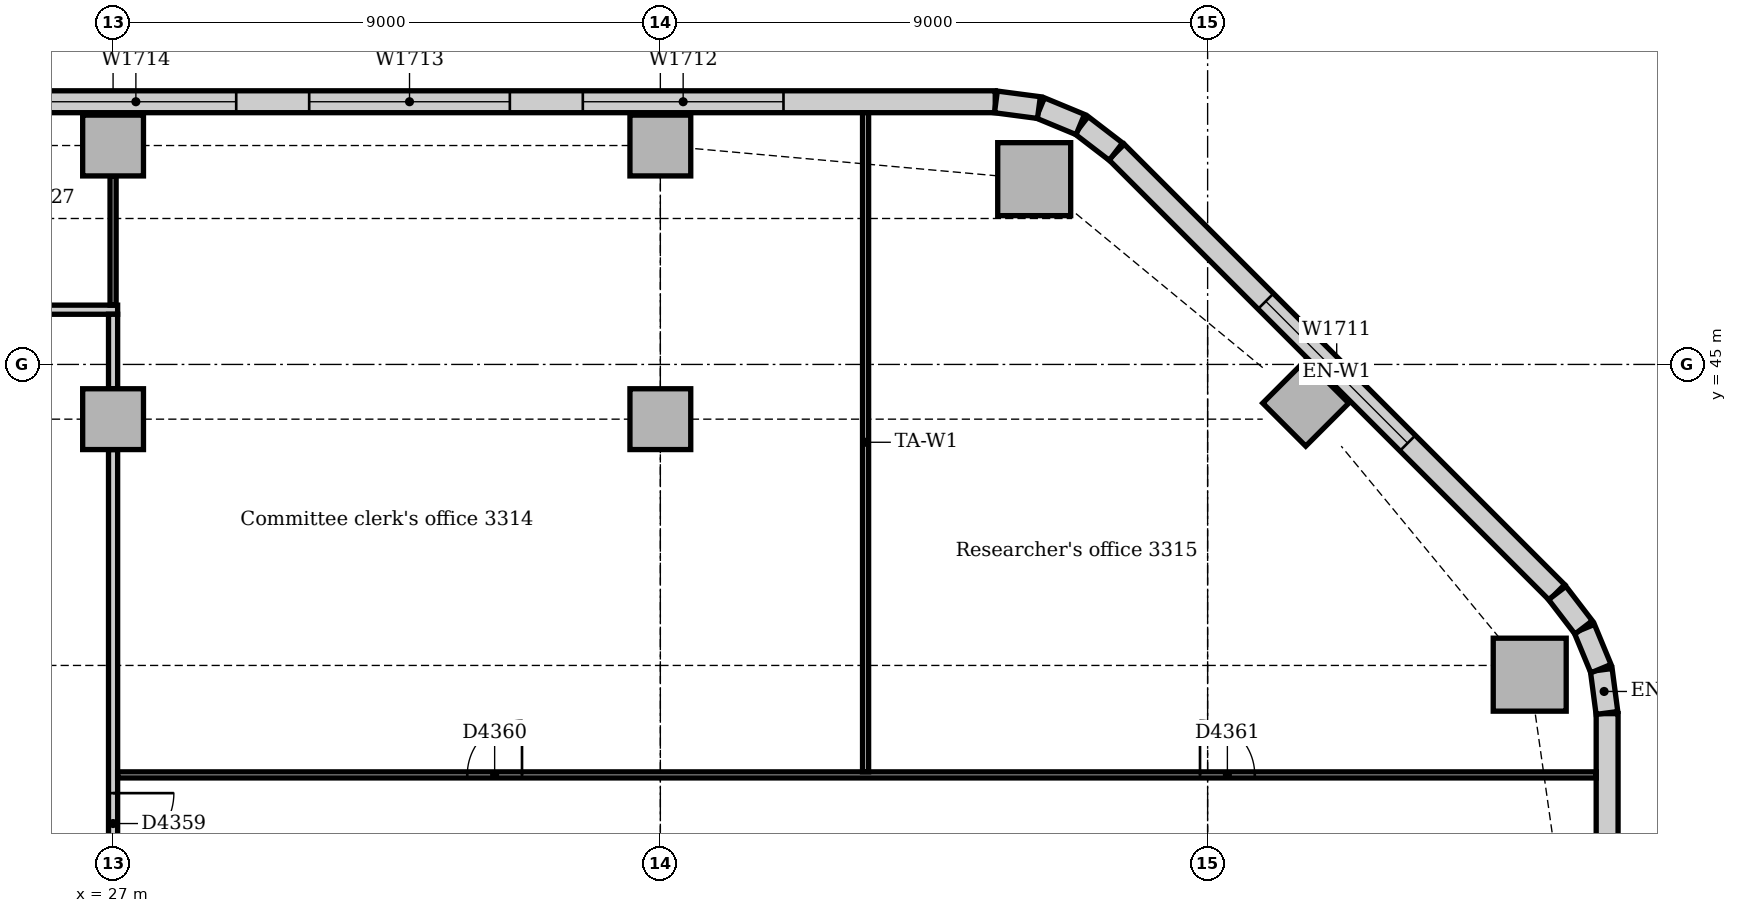
"""IFC4 building model, lengths in metres.
Left out: names, types, materials, properties, quantities, classifications, styles, units other than length and angle.
Written with IfcOpenShell. Run it as: python <this file> out.ifc"""

import sys

from ifc_helpers import new_model, si_unit, direction, frame, frame_2d, origin, origin_2d, place, context, subcontext, project, spatial, rectangle, extrude, element, fill, save


model = new_model("IFC4")
c1 = context("Model", 3, precision=1e-05, world=origin(), true_north=direction((0.0, 1.0)))
c2 = subcontext(c1, "Body", "Model", "MODEL_VIEW")
j1 = project(units=[si_unit("LENGTHUNIT", "METRE"), si_unit("PLANEANGLEUNIT", "RADIAN")], contexts=[c1])
p1 = place(None, origin())
s1 = spatial("IfcSite", under=j1, at=p1, CompositionType="ELEMENT")
p2 = place(p1, origin())
s2 = spatial("IfcBuilding", under=s1, at=p2, CompositionType="ELEMENT")
p3 = place(p2, frame((0.0, 0.0, 140.0)))
s3 = spatial("IfcBuildingStorey", under=s2, at=p3, CompositionType="ELEMENT", Elevation=140.0)
for number, where, z_axis, x_axis in (
    (1, (50.297, 39.898, 0.0), (0.0, 0.0, 1.0), (1.0, 0.0, 0.0)),
    (2, (42.148, 48.047, 0.0), (0.0, 0.0, 1.0), (1.0, 0.0, 0.0)),
):
    element("IfcColumn", number, at=place(p3, frame(where, z_axis=z_axis, x_axis=x_axis)), inside=s3, PredefinedType="COLUMN", context=c2, shape_type="SweptSolid", body=[
        extrude(rectangle(XDim=1.2, YDim=1.2, at=origin_2d()), origin(), (0.0, 0.0, 1.0), 3.7),
    ])
for number, where, z_axis, x_axis in (
    (3, (46.614, 44.364, 0.0), (0.0, 0.0, 1.0), (0.707, 0.707, 0.0)),
    (4, (27.0, 48.6, 0.0), (0.0, 0.0, 1.0), (1.0, 0.0, 0.0)),
    (5, (36.0, 48.6, 0.0), (0.0, 0.0, 1.0), (1.0, 0.0, 0.0)),
    (6, (27.0, 44.1, 0.0), (0.0, 0.0, 1.0), (1.0, 0.0, 0.0)),
    (7, (36.0, 44.1, 0.0), (0.0, 0.0, 1.0), (1.0, 0.0, 0.0)),
):
    element("IfcColumn", number, at=place(p3, frame(where, z_axis=z_axis, x_axis=x_axis)), inside=s3, PredefinedType="COLUMN", context=c2, shape_type="SweptSolid", body=[
        extrude(rectangle(XDim=1.0, YDim=1.0, at=origin_2d()), origin(), (0.0, 0.0, 1.0), 3.7),
    ])
p4 = place(p3, frame((51.57, 14.743, 0.0), z_axis=(0.0, 0.0, 1.0), x_axis=(0.0, 1.0, 0.0)))
e8 = element("IfcWall", 8, at=p4, inside=s3, PredefinedType="STANDARD", context=c2, shape_type="SweptSolid", body=[
    extrude(rectangle(XDim=24.515, YDim=0.36, at=frame_2d((12.257, 0.0))), origin(), (0.0, 0.0, 1.0), 3.7),
])
p5 = place(p4, frame((4.257, 0.0, 0.9)))
e9 = element("IfcOpeningElement", 9, at=p5, cuts=e8, PredefinedType="OPENING", context=c2, shape_type="SweptSolid", body=[
    extrude(rectangle(XDim=1.8, YDim=1.6, at=frame_2d((0.9, 0.8))), frame((0.0, 0.19, 0.0), z_axis=(0.0, -1.0, 0.0), x_axis=(1.0, 0.0, 0.0)), (0.0, 0.0, 1.0), 0.38),
])
p6 = place(p4, frame((8.357, 0.0, 0.9)))
e10 = element("IfcOpeningElement", 10, at=p6, cuts=e8, PredefinedType="OPENING", context=c2, shape_type="SweptSolid", body=[
    extrude(rectangle(XDim=3.3, YDim=1.6, at=frame_2d((1.65, 0.8))), frame((0.0, 0.19, 0.0), z_axis=(0.0, -1.0, 0.0), x_axis=(1.0, 0.0, 0.0)), (0.0, 0.0, 1.0), 0.38),
])
p7 = place(p4, frame((12.857, 0.0, 0.9)))
e11 = element("IfcOpeningElement", 11, at=p7, cuts=e8, PredefinedType="OPENING", context=c2, shape_type="SweptSolid", body=[
    extrude(rectangle(XDim=3.3, YDim=1.6, at=frame_2d((1.65, 0.8))), frame((0.0, 0.19, 0.0), z_axis=(0.0, -1.0, 0.0), x_axis=(1.0, 0.0, 0.0)), (0.0, 0.0, 1.0), 0.38),
])
p8 = place(p4, frame((17.357, 0.0, 0.9)))
e12 = element("IfcOpeningElement", 12, at=p8, cuts=e8, PredefinedType="OPENING", context=c2, shape_type="SweptSolid", body=[
    extrude(rectangle(XDim=3.3, YDim=1.6, at=frame_2d((1.65, 0.8))), frame((0.0, 0.19, 0.0), z_axis=(0.0, -1.0, 0.0), x_axis=(1.0, 0.0, 0.0)), (0.0, 0.0, 1.0), 0.38),
])
p9 = place(p3, frame((50.744, 41.251, 0.0), z_axis=(0.0, 0.0, 1.0), x_axis=(-0.707106781187, 0.707106781187, 0.0)))
e13 = element("IfcWall", 13, at=p9, inside=s3, PredefinedType="STANDARD", context=c2, shape_type="SweptSolid", body=[
    extrude(rectangle(XDim=10.243, YDim=0.36, at=frame_2d((5.121, 0.0))), origin(), (0.0, 0.0, 1.0), 3.7),
])
p10 = place(p9, frame((3.471, 0.0, 0.9)))
e14 = element("IfcOpeningElement", 14, at=p10, cuts=e13, PredefinedType="OPENING", context=c2, shape_type="SweptSolid", body=[
    extrude(rectangle(XDim=3.3, YDim=1.6, at=frame_2d((1.65, 0.8))), frame((0.0, 0.19, 0.0), z_axis=(0.0, -1.0, 0.0), x_axis=(1.0, 0.0, 0.0)), (0.0, 0.0, 1.0), 0.38),
])
p11 = place(p3, frame((41.507, 49.32, 0.0), z_axis=(0.0, 0.0, 1.0), x_axis=(-1.0, 0.0, 0.0)))
e15 = element("IfcWall", 15, at=p11, inside=s3, PredefinedType="STANDARD", context=c2, shape_type="SweptSolid", body=[
    extrude(rectangle(XDim=37.265, YDim=0.36, at=frame_2d((18.632, 0.0))), origin(), (0.0, 0.0, 1.0), 3.7),
])
p12 = place(p11, frame((3.482, 0.0, 0.9)))
e16 = element("IfcOpeningElement", 16, at=p12, cuts=e15, PredefinedType="OPENING", context=c2, shape_type="SweptSolid", body=[
    extrude(rectangle(XDim=3.3, YDim=1.6, at=frame_2d((1.65, 0.8))), frame((0.0, 0.19, 0.0), z_axis=(0.0, -1.0, 0.0), x_axis=(1.0, 0.0, 0.0)), (0.0, 0.0, 1.0), 0.38),
])
p13 = place(p11, frame((7.982, 0.0, 0.9)))
e17 = element("IfcOpeningElement", 17, at=p13, cuts=e15, PredefinedType="OPENING", context=c2, shape_type="SweptSolid", body=[
    extrude(rectangle(XDim=3.3, YDim=1.6, at=frame_2d((1.65, 0.8))), frame((0.0, 0.19, 0.0), z_axis=(0.0, -1.0, 0.0), x_axis=(1.0, 0.0, 0.0)), (0.0, 0.0, 1.0), 0.38),
])
p14 = place(p11, frame((12.482, 0.0, 0.9)))
e18 = element("IfcOpeningElement", 18, at=p14, cuts=e15, PredefinedType="OPENING", context=c2, shape_type="SweptSolid", body=[
    extrude(rectangle(XDim=3.3, YDim=1.6, at=frame_2d((1.65, 0.8))), frame((0.0, 0.19, 0.0), z_axis=(0.0, -1.0, 0.0), x_axis=(1.0, 0.0, 0.0)), (0.0, 0.0, 1.0), 0.38),
])
p15 = place(p11, frame((17.032, 0.0, 0.9)))
e19 = element("IfcOpeningElement", 19, at=p15, cuts=e15, PredefinedType="OPENING", context=c2, shape_type="SweptSolid", body=[
    extrude(rectangle(XDim=1.8, YDim=1.6, at=frame_2d((0.9, 0.8))), frame((0.0, 0.19, 0.0), z_axis=(0.0, -1.0, 0.0), x_axis=(1.0, 0.0, 0.0)), (0.0, 0.0, 1.0), 0.38),
])
p16 = place(p11, frame((21.482, 0.0, 0.9)))
e20 = element("IfcOpeningElement", 20, at=p16, cuts=e15, PredefinedType="OPENING", context=c2, shape_type="SweptSolid", body=[
    extrude(rectangle(XDim=3.3, YDim=1.6, at=frame_2d((1.65, 0.8))), frame((0.0, 0.19, 0.0), z_axis=(0.0, -1.0, 0.0), x_axis=(1.0, 0.0, 0.0)), (0.0, 0.0, 1.0), 0.38),
])
p17 = place(p11, frame((26.032, 0.0, 0.9)))
e21 = element("IfcOpeningElement", 21, at=p17, cuts=e15, PredefinedType="OPENING", context=c2, shape_type="SweptSolid", body=[
    extrude(rectangle(XDim=1.8, YDim=1.6, at=frame_2d((0.9, 0.8))), frame((0.0, 0.19, 0.0), z_axis=(0.0, -1.0, 0.0), x_axis=(1.0, 0.0, 0.0)), (0.0, 0.0, 1.0), 0.38),
])
p18 = place(p11, frame((30.482, 0.0, 0.9)))
e22 = element("IfcOpeningElement", 22, at=p18, cuts=e15, PredefinedType="OPENING", context=c2, shape_type="SweptSolid", body=[
    extrude(rectangle(XDim=3.3, YDim=1.6, at=frame_2d((1.65, 0.8))), frame((0.0, 0.19, 0.0), z_axis=(0.0, -1.0, 0.0), x_axis=(1.0, 0.0, 0.0)), (0.0, 0.0, 1.0), 0.38),
])
for number, where, z_axis, x_axis in (
    (23, (51.567, 39.269, 0.0), (0.0, 0.0, 1.0), (-0.131, 0.991, 0.0)),
    (24, (51.468, 39.997, 0.0), (0.0, 0.0, 1.0), (-0.383, 0.924, 0.0)),
):
    element("IfcWall", number, at=place(p3, frame(where, z_axis=z_axis, x_axis=x_axis)), inside=s3, PredefinedType="STANDARD", context=c2, shape_type="SweptSolid", body=[
        extrude(rectangle(XDim=0.713, YDim=0.36, at=frame_2d((0.356, 0.0))), origin(), (0.0, 0.0, 1.0), 3.7),
    ])
for number, where, z_axis, x_axis in (
    (25, (51.184, 40.675, 0.0), (0.0, 0.0, 1.0), (-0.609, 0.793, 0.0)),
    (26, (43.491, 48.5, 0.0), (0.0, 0.0, 1.0), (-0.793, 0.609, 0.0)),
):
    element("IfcWall", number, at=place(p3, frame(where, z_axis=z_axis, x_axis=x_axis)), inside=s3, PredefinedType="STANDARD", context=c2, shape_type="SweptSolid", body=[
        extrude(rectangle(XDim=0.713, YDim=0.36, at=frame_2d((0.357, 0.0))), origin(), (0.0, 0.0, 1.0), 3.7),
    ])
for number, where, z_axis, x_axis in (
    (27, (42.906, 48.945, 0.0), (0.0, 0.0, 1.0), (-0.924, 0.383, 0.0)),
    (28, (42.226, 49.224, 0.0), (0.0, 0.0, 1.0), (-0.991, 0.131, 0.0)),
):
    element("IfcWall", number, at=place(p3, frame(where, z_axis=z_axis, x_axis=x_axis)), inside=s3, PredefinedType="STANDARD", context=c2, shape_type="SweptSolid", body=[
        extrude(rectangle(XDim=0.713, YDim=0.36, at=frame_2d((0.356, 0.0))), origin(), (0.0, 0.0, 1.0), 3.7),
    ])
p19 = place(p3, frame((2.053, 45.9, 0.0), z_axis=(0.0, 0.0, 1.0), x_axis=(1.0, 0.0, 0.0)))
e29 = element("IfcWall", 29, at=p19, inside=s3, PredefinedType="PARTITIONING", context=c2, shape_type="SweptSolid", body=[
    extrude(rectangle(XDim=25.022, YDim=0.15, at=frame_2d((12.511, 0.0))), origin(), (0.0, 0.0, 1.0), 3.7),
])
p20 = place(p19, frame((5.35, 0.0, 0.0)))
e30 = element("IfcOpeningElement", 30, at=p20, cuts=e29, PredefinedType="OPENING", context=c2, shape_type="SweptSolid", body=[
    extrude(rectangle(XDim=0.9, YDim=2.1, at=frame_2d((0.45, 1.05))), frame((0.0, 0.085, 0.0), z_axis=(0.0, -1.0, 0.0), x_axis=(1.0, 0.0, 0.0)), (0.0, 0.0, 1.0), 0.17),
])
p21 = place(p19, frame((15.497, 0.0, 0.0)))
e31 = element("IfcOpeningElement", 31, at=p21, cuts=e29, PredefinedType="OPENING", context=c2, shape_type="SweptSolid", body=[
    extrude(rectangle(XDim=0.9, YDim=2.1, at=frame_2d((0.45, 1.05))), frame((0.0, 0.085, 0.0), z_axis=(0.0, -1.0, 0.0), x_axis=(1.0, 0.0, 0.0)), (0.0, 0.0, 1.0), 0.17),
])
p22 = place(p19, frame((22.197, 0.0, 0.0)))
e32 = element("IfcOpeningElement", 32, at=p22, cuts=e29, PredefinedType="OPENING", context=c2, shape_type="SweptSolid", body=[
    extrude(rectangle(XDim=0.9, YDim=2.1, at=frame_2d((0.45, 1.05))), frame((0.0, 0.085, 0.0), z_axis=(0.0, -1.0, 0.0), x_axis=(1.0, 0.0, 0.0)), (0.0, 0.0, 1.0), 0.17),
])
p23 = place(p3, frame((27.0, 36.5, 0.0), z_axis=(0.0, 0.0, 1.0), x_axis=(0.0, 1.0, 0.0)))
e33 = element("IfcWall", 33, at=p23, inside=s3, PredefinedType="PARTITIONING", context=c2, shape_type="SweptSolid", body=[
    extrude(rectangle(XDim=7.1, YDim=0.15, at=frame_2d((3.55, 0.0))), origin(), (0.0, 0.0, 1.0), 3.106),
])
p24 = place(p23, frame((0.45, 0.0, 0.0)))
e34 = element("IfcOpeningElement", 34, at=p24, cuts=e33, PredefinedType="OPENING", context=c2, shape_type="SweptSolid", body=[
    extrude(rectangle(XDim=1.0, YDim=2.1, at=frame_2d((0.5, 1.05))), frame((0.0, 0.085, 0.0), z_axis=(0.0, -1.0, 0.0), x_axis=(1.0, 0.0, 0.0)), (0.0, 0.0, 1.0), 0.17),
])
p25 = place(p3, frame((27.0, 44.6, 0.0), z_axis=(0.0, 0.0, 1.0), x_axis=(0.0, 1.0, 0.0)))
e35 = element("IfcWall", 35, at=p25, inside=s3, PredefinedType="PARTITIONING", context=c2, shape_type="SweptSolid", body=[
    extrude(rectangle(XDim=1.225, YDim=0.15, at=frame_2d((0.613, 0.0))), origin(), (0.0, 0.0, 1.0), 3.502),
])
p26 = place(p3, frame((27.075, 38.25, 0.0), z_axis=(0.0, 0.0, 1.0), x_axis=(1.0, 0.0, 0.0)))
e36 = element("IfcWall", 36, at=p26, inside=s3, PredefinedType="PARTITIONING", context=c2, shape_type="SweptSolid", body=[
    extrude(rectangle(XDim=24.315, YDim=0.1, at=frame_2d((12.158, 0.0))), origin(), (0.0, 0.0, 1.0), 3.7),
])
p27 = place(p26, frame((5.75, 0.0, 0.0)))
e37 = element("IfcOpeningElement", 37, at=p27, cuts=e36, PredefinedType="OPENING", context=c2, shape_type="SweptSolid", body=[
    extrude(rectangle(XDim=0.9, YDim=2.1, at=frame_2d((0.45, 1.05))), frame((0.0, 0.06, 0.0), z_axis=(0.0, -1.0, 0.0), x_axis=(1.0, 0.0, 0.0)), (0.0, 0.0, 1.0), 0.12),
])
p28 = place(p26, frame((17.8, 0.0, 0.0)))
e38 = element("IfcOpeningElement", 38, at=p28, cuts=e36, PredefinedType="OPENING", context=c2, shape_type="SweptSolid", body=[
    extrude(rectangle(XDim=0.9, YDim=2.1, at=frame_2d((0.45, 1.05))), frame((0.0, 0.06, 0.0), z_axis=(0.0, -1.0, 0.0), x_axis=(1.0, 0.0, 0.0)), (0.0, 0.0, 1.0), 0.12),
])
p29 = place(p3, frame((39.375, 38.3, 0.0), z_axis=(0.0, 0.0, 1.0), x_axis=(0.0, 1.0, 0.0)))
e39 = element("IfcWall", 39, at=p29, inside=s3, PredefinedType="PARTITIONING", context=c2, shape_type="SweptSolid", body=[
    extrude(rectangle(XDim=10.84, YDim=0.1, at=frame_2d((5.42, 0.0))), origin(), (0.0, 0.0, 1.0), 3.7),
])
p30 = place(p3, frame((27.0, 45.975, 0.0), z_axis=(0.0, 0.0, 1.0), x_axis=(0.0, 1.0, 0.0)))
e40 = element("IfcWall", 40, at=p30, inside=s3, PredefinedType="PARTITIONING", context=c2, shape_type="SweptSolid", body=[
    extrude(rectangle(XDim=2.125, YDim=0.1, at=frame_2d((1.062, 0.0))), origin(), (0.0, 0.0, 1.0), 3.502),
])
p31 = place(p10, origin())
e41 = element("IfcWindow", 41, at=p31, inside=s3, PartitioningType="SINGLE_PANEL", PredefinedType="WINDOW", context=c2, shape_type="SweptSolid", body=[
    extrude(rectangle(XDim=3.3, YDim=1.6, at=frame_2d((1.65, 0.8))), frame((0.0, 0.13, 0.0), z_axis=(0.0, -1.0, 0.0), x_axis=(1.0, 0.0, 0.0)), (0.0, 0.0, 1.0), 0.06),
])
fill(e14, e41)
p32 = place(p12, origin())
e42 = element("IfcWindow", 42, at=p32, inside=s3, PartitioningType="SINGLE_PANEL", PredefinedType="WINDOW", context=c2, shape_type="SweptSolid", body=[
    extrude(rectangle(XDim=3.3, YDim=1.6, at=frame_2d((1.65, 0.8))), frame((0.0, 0.13, 0.0), z_axis=(0.0, -1.0, 0.0), x_axis=(1.0, 0.0, 0.0)), (0.0, 0.0, 1.0), 0.06),
])
fill(e16, e42)
p33 = place(p13, origin())
e43 = element("IfcWindow", 43, at=p33, inside=s3, PartitioningType="SINGLE_PANEL", PredefinedType="WINDOW", context=c2, shape_type="SweptSolid", body=[
    extrude(rectangle(XDim=3.3, YDim=1.6, at=frame_2d((1.65, 0.8))), frame((0.0, 0.13, 0.0), z_axis=(0.0, -1.0, 0.0), x_axis=(1.0, 0.0, 0.0)), (0.0, 0.0, 1.0), 0.06),
])
fill(e17, e43)
p34 = place(p14, origin())
e44 = element("IfcWindow", 44, at=p34, inside=s3, PartitioningType="SINGLE_PANEL", PredefinedType="WINDOW", context=c2, shape_type="SweptSolid", body=[
    extrude(rectangle(XDim=3.3, YDim=1.6, at=frame_2d((1.65, 0.8))), frame((0.0, 0.13, 0.0), z_axis=(0.0, -1.0, 0.0), x_axis=(1.0, 0.0, 0.0)), (0.0, 0.0, 1.0), 0.06),
])
fill(e18, e44)
p35 = place(p24, frame((1.0, 0.0, 0.0), z_axis=(0.0, 0.0, 1.0), x_axis=(-1.0, 0.0, 0.0)))
e45 = element("IfcDoor", 45, at=p35, inside=s3, OperationType="SINGLE_SWING_LEFT", PredefinedType="DOOR", context=c2, shape_type="SweptSolid", body=[
    extrude(rectangle(XDim=1.0, YDim=2.1, at=frame_2d((0.5, 1.05))), frame((0.0, 0.025, 0.0), z_axis=(0.0, -1.0, 0.0), x_axis=(1.0, 0.0, 0.0)), (0.0, 0.0, 1.0), 0.05),
])
fill(e34, e45)
p36 = place(p27, origin())
e46 = element("IfcDoor", 46, at=p36, inside=s3, OperationType="SINGLE_SWING_RIGHT", PredefinedType="DOOR", context=c2, shape_type="SweptSolid", body=[
    extrude(rectangle(XDim=0.9, YDim=2.1, at=frame_2d((0.45, 1.05))), frame((0.0, 0.025, 0.0), z_axis=(0.0, -1.0, 0.0), x_axis=(1.0, 0.0, 0.0)), (0.0, 0.0, 1.0), 0.05),
])
fill(e37, e46)
p37 = place(p28, origin())
e47 = element("IfcDoor", 47, at=p37, inside=s3, OperationType="SINGLE_SWING_LEFT", PredefinedType="DOOR", context=c2, shape_type="SweptSolid", body=[
    extrude(rectangle(XDim=0.9, YDim=2.1, at=frame_2d((0.45, 1.05))), frame((0.0, 0.025, 0.0), z_axis=(0.0, -1.0, 0.0), x_axis=(1.0, 0.0, 0.0)), (0.0, 0.0, 1.0), 0.05),
])
fill(e38, e47)
save(model, sys.argv[1])
